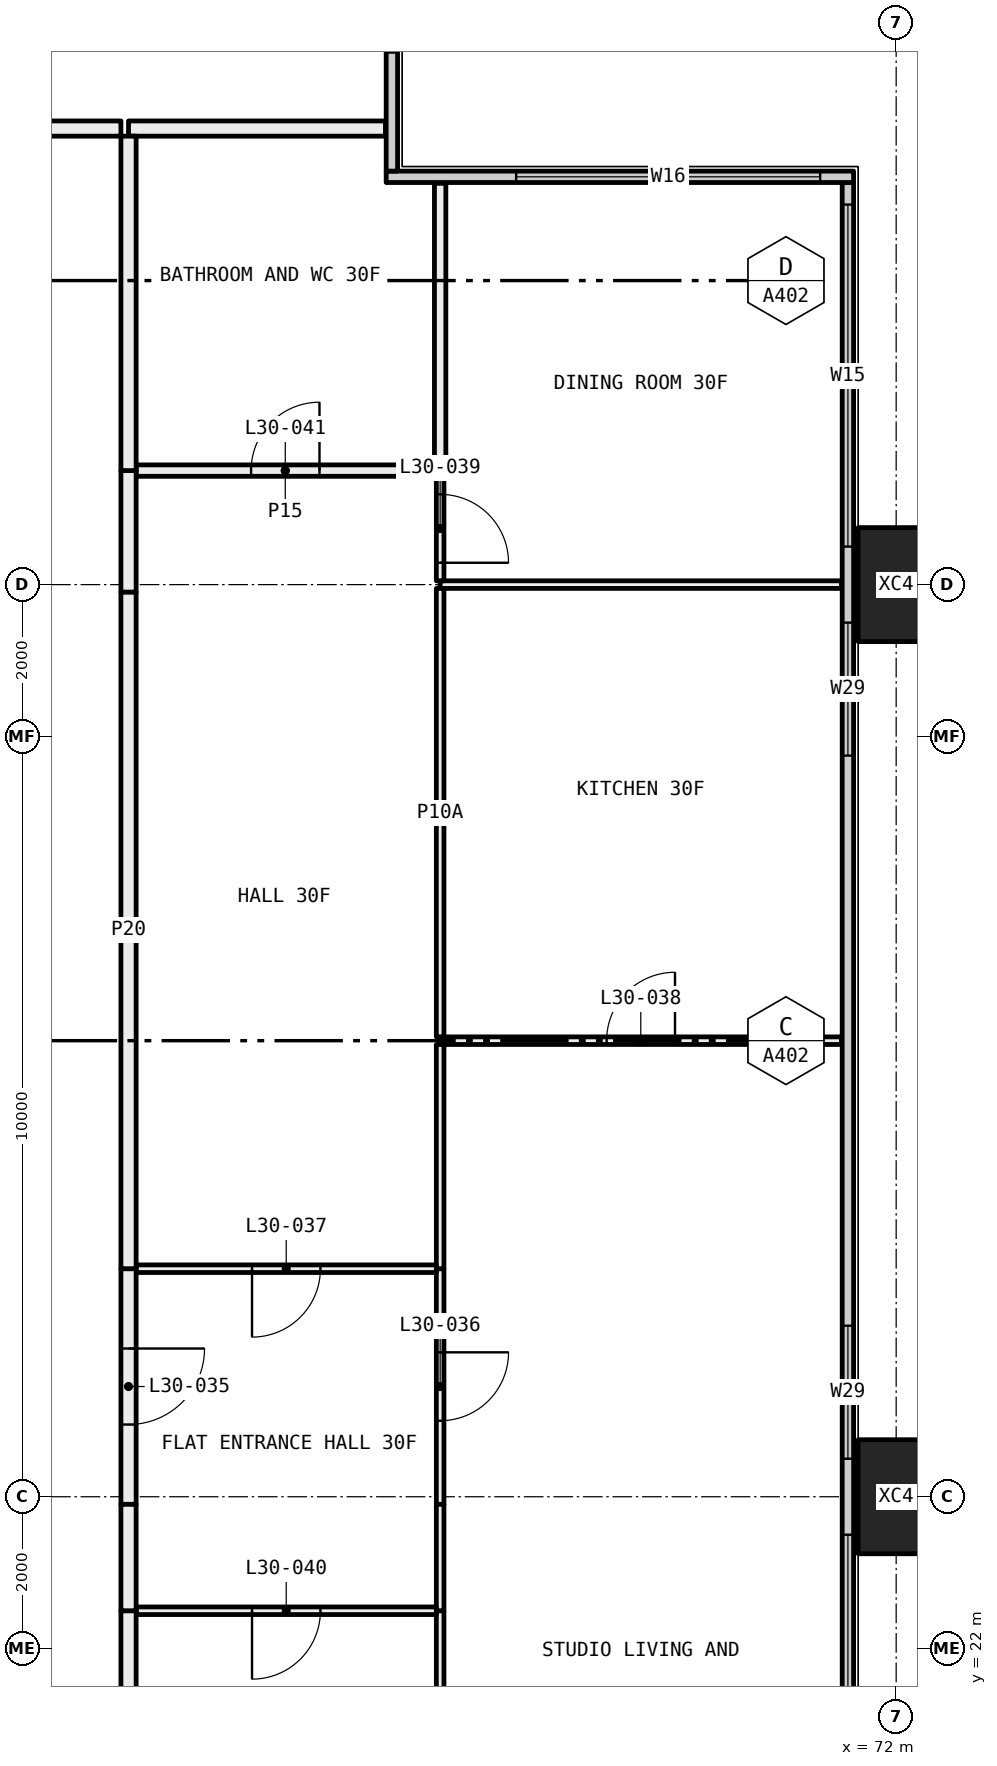
"""IFC4 building model, lengths in metres.
Left out: names, types, materials, properties, quantities, classifications, styles, units other than length and angle.
Written with IfcOpenShell. Run it as: python <this file> out.ifc"""

import sys

from ifc_helpers import new_model, si_unit, direction, frame, frame_2d, origin, origin_2d, place, context, subcontext, project, spatial, rectangle, hollow_rectangle, extrude, element, fill, save


model = new_model("IFC4")
c1 = context("Model", 3, precision=1e-05, world=origin(), true_north=direction((0.0, 1.0)))
c2 = subcontext(c1, "Body", "Model", "MODEL_VIEW")
j1 = project(units=[si_unit("LENGTHUNIT", "METRE"), si_unit("PLANEANGLEUNIT", "RADIAN")], contexts=[c1])
p1 = place(None, origin())
s1 = spatial("IfcSite", under=j1, at=p1, CompositionType="ELEMENT")
p2 = place(p1, origin())
s2 = spatial("IfcBuilding", under=s1, at=p2, CompositionType="ELEMENT")
p3 = place(p2, frame((0.0, 0.0, 117.3)))
s3 = spatial("IfcBuildingStorey", under=s2, at=p3, CompositionType="ELEMENT", Elevation=117.3)
for number, where, z_axis, x_axis in (
    (1, (72.0, 24.0, -0.4), (0.0, 0.0, 1.0), (0.0, 1.0, 0.0)),
    (2, (72.0, 36.0, -0.4), (0.0, 0.0, 1.0), (0.0, 1.0, 0.0)),
):
    element("IfcColumn", number, at=place(p3, frame(where, z_axis=z_axis, x_axis=x_axis)), inside=s3, PredefinedType="COLUMN", context=c2, shape_type="SweptSolid", body=[
        extrude(hollow_rectangle(XDim=1.5, YDim=1.0, WallThickness=0.06, at=origin_2d()), origin(), (0.0, 0.0, 1.0), 3.45),
    ])
p4 = place(p3, frame((71.365, 18.71, 0.0), z_axis=(0.0, 0.0, 1.0), x_axis=(0.0, 1.0, 0.0)))
e3 = element("IfcWall", 3, at=p4, inside=s3, PredefinedType="ELEMENTEDWALL", context=c2, shape_type="SweptSolid", body=[
    extrude(rectangle(XDim=22.58, YDim=0.15, at=frame_2d((11.29, 0.0))), origin(), (0.0, 0.0, 1.0), 3.05),
])
p5 = place(p4, frame((0.29, 0.0, 0.45)))
e4 = element("IfcOpeningElement", 4, at=p5, cuts=e3, PredefinedType="OPENING", context=c2, shape_type="SweptSolid", body=[
    extrude(rectangle(XDim=4.5, YDim=2.55, at=frame_2d((2.25, 1.275))), frame((0.0, 0.085, 0.0), z_axis=(0.0, -1.0, 0.0), x_axis=(1.0, 0.0, 0.0)), (0.0, 0.0, 1.0), 0.17),
])
p6 = place(p4, frame((5.79, 0.0, 0.45)))
e5 = element("IfcOpeningElement", 5, at=p6, cuts=e3, PredefinedType="OPENING", context=c2, shape_type="SweptSolid", body=[
    extrude(rectangle(XDim=1.75, YDim=2.55, at=frame_2d((0.875, 1.275))), frame((0.0, 0.085, 0.0), z_axis=(0.0, -1.0, 0.0), x_axis=(1.0, 0.0, 0.0)), (0.0, 0.0, 1.0), 0.17),
])
p7 = place(p4, frame((15.04, 0.0, 0.45)))
e6 = element("IfcOpeningElement", 6, at=p7, cuts=e3, PredefinedType="OPENING", context=c2, shape_type="SweptSolid", body=[
    extrude(rectangle(XDim=1.75, YDim=2.55, at=frame_2d((0.875, 1.275))), frame((0.0, 0.085, 0.0), z_axis=(0.0, -1.0, 0.0), x_axis=(1.0, 0.0, 0.0)), (0.0, 0.0, 1.0), 0.17),
])
p8 = place(p4, frame((17.79, 0.0, 0.45)))
e7 = element("IfcOpeningElement", 7, at=p8, cuts=e3, PredefinedType="OPENING", context=c2, shape_type="SweptSolid", body=[
    extrude(rectangle(XDim=4.5, YDim=2.55, at=frame_2d((2.25, 1.275))), frame((0.0, 0.085, 0.0), z_axis=(0.0, -1.0, 0.0), x_axis=(1.0, 0.0, 0.0)), (0.0, 0.0, 1.0), 0.17),
])
p9 = place(p3, frame((65.29, 41.365, 0.0), z_axis=(0.0, 0.0, 1.0), x_axis=(1.0, 0.0, 0.0)))
e8 = element("IfcWall", 8, at=p9, inside=s3, PredefinedType="ELEMENTEDWALL", context=c2, shape_type="SweptSolid", body=[
    extrude(rectangle(XDim=6.15, YDim=0.15, at=frame_2d((3.075, 0.0))), origin(), (0.0, 0.0, 1.0), 3.05),
])
p10 = place(p9, frame((1.71, 0.0, 0.45)))
e9 = element("IfcOpeningElement", 9, at=p10, cuts=e8, PredefinedType="OPENING", context=c2, shape_type="SweptSolid", body=[
    extrude(rectangle(XDim=4.0, YDim=2.55, at=frame_2d((2.0, 1.275))), frame((0.0, 0.085, 0.0), z_axis=(0.0, -1.0, 0.0), x_axis=(1.0, 0.0, 0.0)), (0.0, 0.0, 1.0), 0.17),
])
p11 = place(p3, frame((65.365, 41.44, 0.0), z_axis=(0.0, 0.0, 1.0), x_axis=(0.0, 1.0, 0.0)))
e10 = element("IfcWall", 10, at=p11, inside=s3, PredefinedType="ELEMENTEDWALL", context=c2, shape_type="SweptSolid", body=[
    extrude(rectangle(XDim=5.85, YDim=0.15, at=frame_2d((2.925, 0.0))), origin(), (0.0, 0.0, 1.0), 3.05),
])
p12 = place(p11, frame((1.56, 0.0, 0.45)))
e11 = element("IfcOpeningElement", 11, at=p12, cuts=e10, PredefinedType="OPENING", context=c2, shape_type="SweptSolid", body=[
    extrude(rectangle(XDim=4.0, YDim=2.55, at=frame_2d((2.0, 1.275))), frame((0.0, 0.085, 0.0), z_axis=(0.0, -1.0, 0.0), x_axis=(1.0, 0.0, 0.0)), (0.0, 0.0, 1.0), 0.17),
])
p13 = place(p3, frame((71.28, 30.0, 0.0), z_axis=(0.0, 0.0, 1.0), x_axis=(-1.0, 0.0, 0.0)))
e12 = element("IfcWall", 12, at=p13, inside=s3, PredefinedType="PARTITIONING", context=c2, shape_type="SweptSolid", body=[
    extrude(rectangle(XDim=5.28, YDim=0.1, at=frame_2d((2.64, 0.0))), origin(), (0.0, 0.0, 1.0), 3.05),
])
p14 = place(p13, frame((2.19, 0.0, 0.0)))
e13 = element("IfcOpeningElement", 13, at=p14, cuts=e12, PredefinedType="OPENING", context=c2, shape_type="SweptSolid", body=[
    extrude(rectangle(XDim=0.9, YDim=2.1, at=frame_2d((0.45, 1.05))), frame((0.0, 0.06, 0.0), z_axis=(0.0, -1.0, 0.0), x_axis=(1.0, 0.0, 0.0)), (0.0, 0.0, 1.0), 0.12),
])
p15 = place(p3, frame((66.0, 22.5, 0.0), z_axis=(0.0, 0.0, 1.0), x_axis=(0.0, -1.0, 0.0)))
e14 = element("IfcWall", 14, at=p15, inside=s3, PredefinedType="PARTITIONING", context=c2, shape_type="SweptSolid", body=[
    extrude(rectangle(XDim=3.78, YDim=0.1, at=frame_2d((1.89, 0.0))), origin(), (0.0, 0.0, 1.0), 3.05),
])
p16 = place(p3, frame((66.0, 27.0, 0.0), z_axis=(0.0, 0.0, 1.0), x_axis=(0.0, -1.0, 0.0)))
e15 = element("IfcWall", 15, at=p16, inside=s3, PredefinedType="PARTITIONING", context=c2, shape_type="SweptSolid", body=[
    extrude(rectangle(XDim=3.1, YDim=0.1, at=frame_2d((1.55, 0.0))), origin(), (0.0, 0.0, 1.0), 2.45),
])
p17 = place(p16, frame((1.1, 0.0, 0.0)))
e16 = element("IfcOpeningElement", 16, at=p17, cuts=e15, PredefinedType="OPENING", context=c2, shape_type="SweptSolid", body=[
    extrude(rectangle(XDim=0.9, YDim=2.1, at=frame_2d((0.45, 1.05))), frame((0.0, 0.06, 0.0), z_axis=(0.0, -1.0, 0.0), x_axis=(1.0, 0.0, 0.0)), (0.0, 0.0, 1.0), 0.12),
])
p18 = place(p3, frame((66.0, 23.9, 0.0), z_axis=(0.0, 0.0, 1.0), x_axis=(0.0, -1.0, 0.0)))
e17 = element("IfcWall", 17, at=p18, inside=s3, PredefinedType="PARTITIONING", context=c2, shape_type="SweptSolid", body=[
    extrude(rectangle(XDim=1.4, YDim=0.1, at=frame_2d((0.7, 0.0))), origin(), (0.0, 0.0, 1.0), 3.05),
])
p19 = place(p3, frame((66.0, 29.95, 0.0), z_axis=(0.0, 0.0, 1.0), x_axis=(0.0, -1.0, 0.0)))
e18 = element("IfcWall", 18, at=p19, inside=s3, PredefinedType="PARTITIONING", context=c2, shape_type="SweptSolid", body=[
    extrude(rectangle(XDim=2.95, YDim=0.1, at=frame_2d((1.475, 0.0))), origin(), (0.0, 0.0, 1.0), 3.05),
])
p20 = place(p3, frame((71.28, 36.0, 0.0), z_axis=(0.0, 0.0, 1.0), x_axis=(-1.0, 0.0, 0.0)))
e19 = element("IfcWall", 19, at=p20, inside=s3, PredefinedType="PARTITIONING", context=c2, shape_type="SweptSolid", body=[
    extrude(rectangle(XDim=5.28, YDim=0.1, at=frame_2d((2.64, 0.0))), origin(), (0.0, 0.0, 1.0), 2.45),
])
p21 = place(p3, frame((66.0, 35.95, 0.0), z_axis=(0.0, 0.0, 1.0), x_axis=(0.0, -1.0, 0.0)))
e20 = element("IfcWall", 20, at=p21, inside=s3, PredefinedType="PARTITIONING", context=c2, shape_type="SweptSolid", body=[
    extrude(rectangle(XDim=5.9, YDim=0.1, at=frame_2d((2.95, 0.0))), origin(), (0.0, 0.0, 1.0), 2.45),
])
p22 = place(p3, frame((66.0, 37.425, 0.0), z_axis=(0.0, 0.0, 1.0), x_axis=(0.0, -1.0, 0.0)))
e21 = element("IfcWall", 21, at=p22, inside=s3, PredefinedType="PARTITIONING", context=c2, shape_type="SweptSolid", body=[
    extrude(rectangle(XDim=1.375, YDim=0.1, at=frame_2d((0.688, 0.0))), origin(), (0.0, 0.0, 1.0), 2.45),
])
p23 = place(p22, frame((0.238, 0.0, 0.0)))
e22 = element("IfcOpeningElement", 22, at=p23, cuts=e21, PredefinedType="OPENING", context=c2, shape_type="SweptSolid", body=[
    extrude(rectangle(XDim=0.9, YDim=2.1, at=frame_2d((0.45, 1.05))), frame((0.0, 0.06, 0.0), z_axis=(0.0, -1.0, 0.0), x_axis=(1.0, 0.0, 0.0)), (0.0, 0.0, 1.0), 0.12),
])
p24 = place(p3, frame((66.0, 41.28, 0.0), z_axis=(0.0, 0.0, 1.0), x_axis=(0.0, -1.0, 0.0)))
e23 = element("IfcWall", 23, at=p24, inside=s3, PredefinedType="PARTITIONING", context=c2, shape_type="SweptSolid", body=[
    extrude(rectangle(XDim=3.78, YDim=0.15, at=frame_2d((1.89, 0.0))), origin(), (0.0, 0.0, 1.0), 3.05),
])
p25 = place(p3, frame((65.95, 22.5, 0.0), z_axis=(0.0, 0.0, 1.0), x_axis=(-1.0, 0.0, 0.0)))
e24 = element("IfcWall", 24, at=p25, inside=s3, PredefinedType="PARTITIONING", context=c2, shape_type="SweptSolid", body=[
    extrude(rectangle(XDim=3.95, YDim=0.1, at=frame_2d((1.975, 0.0))), origin(), (0.0, 0.0, 1.0), 3.05),
])
p26 = place(p25, frame((1.525, 0.0, 0.0)))
e25 = element("IfcOpeningElement", 25, at=p26, cuts=e24, PredefinedType="OPENING", context=c2, shape_type="SweptSolid", body=[
    extrude(rectangle(XDim=0.9, YDim=2.1, at=frame_2d((0.45, 1.05))), frame((0.0, 0.06, 0.0), z_axis=(0.0, -1.0, 0.0), x_axis=(1.0, 0.0, 0.0)), (0.0, 0.0, 1.0), 0.12),
])
p27 = place(p3, frame((61.9, 22.5, 0.0), z_axis=(0.0, 0.0, 1.0), x_axis=(0.0, -1.0, 0.0)))
e26 = element("IfcWall", 26, at=p27, inside=s3, PredefinedType="PARTITIONING", context=c2, shape_type="SweptSolid", body=[
    extrude(rectangle(XDim=4.4, YDim=0.2, at=frame_2d((2.2, 0.0))), origin(), (0.0, 0.0, 1.0), 3.05),
])
p28 = place(p3, frame((65.95, 27.0, 0.0), z_axis=(0.0, 0.0, 1.0), x_axis=(-1.0, 0.0, 0.0)))
e27 = element("IfcWall", 27, at=p28, inside=s3, PredefinedType="PARTITIONING", context=c2, shape_type="SweptSolid", body=[
    extrude(rectangle(XDim=3.95, YDim=0.1, at=frame_2d((1.975, 0.0))), origin(), (0.0, 0.0, 1.0), 3.05),
])
p29 = place(p28, frame((1.525, 0.0, 0.0)))
e28 = element("IfcOpeningElement", 28, at=p29, cuts=e27, PredefinedType="OPENING", context=c2, shape_type="SweptSolid", body=[
    extrude(rectangle(XDim=0.9, YDim=2.1, at=frame_2d((0.45, 1.05))), frame((0.0, 0.06, 0.0), z_axis=(0.0, -1.0, 0.0), x_axis=(1.0, 0.0, 0.0)), (0.0, 0.0, 1.0), 0.12),
])
p30 = place(p3, frame((61.9, 27.0, 0.0), z_axis=(0.0, 0.0, 1.0), x_axis=(0.0, -1.0, 0.0)))
e29 = element("IfcWall", 29, at=p30, inside=s3, PredefinedType="PARTITIONING", context=c2, shape_type="SweptSolid", body=[
    extrude(rectangle(XDim=3.1, YDim=0.2, at=frame_2d((1.55, 0.0))), origin(), (0.0, 0.0, 1.0), 2.45),
])
p31 = place(p30, frame((1.05, 0.0, 0.0)))
e30 = element("IfcOpeningElement", 30, at=p31, cuts=e29, PredefinedType="OPENING", context=c2, shape_type="SweptSolid", body=[
    extrude(rectangle(XDim=1.0, YDim=2.1, at=frame_2d((0.5, 1.05))), frame((0.0, 0.11, 0.0), z_axis=(0.0, -1.0, 0.0), x_axis=(1.0, 0.0, 0.0)), (0.0, 0.0, 1.0), 0.22),
])
p32 = place(p3, frame((61.9, 23.9, 0.0), z_axis=(0.0, 0.0, 1.0), x_axis=(0.0, -1.0, 0.0)))
e31 = element("IfcWall", 31, at=p32, inside=s3, PredefinedType="PARTITIONING", context=c2, shape_type="SweptSolid", body=[
    extrude(rectangle(XDim=1.4, YDim=0.2, at=frame_2d((0.7, 0.0))), origin(), (0.0, 0.0, 1.0), 3.05),
])
p33 = place(p3, frame((65.925, 37.5, 0.0), z_axis=(0.0, 0.0, 1.0), x_axis=(-1.0, 0.0, 0.0)))
e32 = element("IfcWall", 32, at=p33, inside=s3, PredefinedType="PARTITIONING", context=c2, shape_type="SweptSolid", body=[
    extrude(rectangle(XDim=3.925, YDim=0.15, at=frame_2d((1.962, 0.0))), origin(), (0.0, 0.0, 1.0), 3.05),
])
p34 = place(p33, frame((1.512, 0.0, 0.0)))
e33 = element("IfcOpeningElement", 33, at=p34, cuts=e32, PredefinedType="OPENING", context=c2, shape_type="SweptSolid", body=[
    extrude(rectangle(XDim=0.9, YDim=2.1, at=frame_2d((0.45, 1.05))), frame((0.0, 0.085, 0.0), z_axis=(0.0, -1.0, 0.0), x_axis=(1.0, 0.0, 0.0)), (0.0, 0.0, 1.0), 0.17),
])
p35 = place(p3, frame((61.9, 37.5, 0.0), z_axis=(0.0, 0.0, 1.0), x_axis=(0.0, -1.0, 0.0)))
e34 = element("IfcWall", 34, at=p35, inside=s3, PredefinedType="PARTITIONING", context=c2, shape_type="SweptSolid", body=[
    extrude(rectangle(XDim=1.6, YDim=0.2, at=frame_2d((0.8, 0.0))), origin(), (0.0, 0.0, 1.0), 2.45),
])
p36 = place(p3, frame((61.9, 35.9, 0.0), z_axis=(0.0, 0.0, 1.0), x_axis=(0.0, -1.0, 0.0)))
e35 = element("IfcWall", 35, at=p36, inside=s3, PredefinedType="PARTITIONING", context=c2, shape_type="SweptSolid", body=[
    extrude(rectangle(XDim=8.9, YDim=0.2, at=frame_2d((4.45, 0.0))), origin(), (0.0, 0.0, 1.0), 3.05),
])
p37 = place(p3, frame((65.28, 42.0, 0.0), z_axis=(0.0, 0.0, 1.0), x_axis=(-1.0, 0.0, 0.0)))
e36 = element("IfcWall", 36, at=p37, inside=s3, PredefinedType="PARTITIONING", context=c2, shape_type="SweptSolid", body=[
    extrude(rectangle(XDim=3.38, YDim=0.2, at=frame_2d((1.69, 0.0))), origin(), (0.0, 0.0, 1.0), 3.05),
])
p38 = place(p3, frame((61.9, 41.9, 0.0), z_axis=(0.0, 0.0, 1.0), x_axis=(0.0, -1.0, 0.0)))
e37 = element("IfcWall", 37, at=p38, inside=s3, PredefinedType="PARTITIONING", context=c2, shape_type="SweptSolid", body=[
    extrude(rectangle(XDim=4.4, YDim=0.2, at=frame_2d((2.2, 0.0))), origin(), (0.0, 0.0, 1.0), 3.05),
])
p39 = place(p3, frame((54.0, 42.0, 0.0), z_axis=(0.0, 0.0, 1.0), x_axis=(1.0, 0.0, 0.0)))
e38 = element("IfcWall", 38, at=p39, inside=s3, PredefinedType="PARTITIONING", context=c2, shape_type="SweptSolid", body=[
    extrude(rectangle(XDim=7.8, YDim=0.2, at=frame_2d((3.9, 0.0))), origin(), (0.0, 0.0, 1.0), 3.05),
])
p40 = place(p5, origin())
e39 = element("IfcWindow", 39, at=p40, inside=s3, PartitioningType="SINGLE_PANEL", PredefinedType="WINDOW", context=c2, shape_type="SweptSolid", body=[
    extrude(rectangle(XDim=4.5, YDim=2.55, at=frame_2d((2.25, 1.275))), frame((0.0, 0.03, 0.0), z_axis=(0.0, -1.0, 0.0), x_axis=(1.0, 0.0, 0.0)), (0.0, 0.0, 1.0), 0.06),
])
fill(e4, e39)
p41 = place(p6, origin())
e40 = element("IfcWindow", 40, at=p41, inside=s3, PartitioningType="SINGLE_PANEL", PredefinedType="WINDOW", context=c2, shape_type="SweptSolid", body=[
    extrude(rectangle(XDim=1.75, YDim=2.55, at=frame_2d((0.875, 1.275))), frame((0.0, 0.03, 0.0), z_axis=(0.0, -1.0, 0.0), x_axis=(1.0, 0.0, 0.0)), (0.0, 0.0, 1.0), 0.06),
])
fill(e5, e40)
p42 = place(p7, origin())
e41 = element("IfcWindow", 41, at=p42, inside=s3, PartitioningType="SINGLE_PANEL", PredefinedType="WINDOW", context=c2, shape_type="SweptSolid", body=[
    extrude(rectangle(XDim=1.75, YDim=2.55, at=frame_2d((0.875, 1.275))), frame((0.0, 0.03, 0.0), z_axis=(0.0, -1.0, 0.0), x_axis=(1.0, 0.0, 0.0)), (0.0, 0.0, 1.0), 0.06),
])
fill(e6, e41)
p43 = place(p8, origin())
e42 = element("IfcWindow", 42, at=p43, inside=s3, PartitioningType="SINGLE_PANEL", PredefinedType="WINDOW", context=c2, shape_type="SweptSolid", body=[
    extrude(rectangle(XDim=4.5, YDim=2.55, at=frame_2d((2.25, 1.275))), frame((0.0, 0.03, 0.0), z_axis=(0.0, -1.0, 0.0), x_axis=(1.0, 0.0, 0.0)), (0.0, 0.0, 1.0), 0.06),
])
fill(e7, e42)
p44 = place(p10, origin())
e43 = element("IfcWindow", 43, at=p44, inside=s3, PartitioningType="SINGLE_PANEL", PredefinedType="WINDOW", context=c2, shape_type="SweptSolid", body=[
    extrude(rectangle(XDim=4.0, YDim=2.55, at=frame_2d((2.0, 1.275))), frame((0.0, 0.03, 0.0), z_axis=(0.0, -1.0, 0.0), x_axis=(1.0, 0.0, 0.0)), (0.0, 0.0, 1.0), 0.06),
])
fill(e9, e43)
p45 = place(p31, origin())
e44 = element("IfcDoor", 44, at=p45, inside=s3, OperationType="SINGLE_SWING_RIGHT", PredefinedType="DOOR", context=c2, shape_type="SweptSolid", body=[
    extrude(rectangle(XDim=1.0, YDim=2.1, at=frame_2d((0.5, 1.05))), frame((0.0, 0.025, 0.0), z_axis=(0.0, -1.0, 0.0), x_axis=(1.0, 0.0, 0.0)), (0.0, 0.0, 1.0), 0.05),
])
fill(e30, e44)
p46 = place(p17, origin())
e45 = element("IfcDoor", 45, at=p46, inside=s3, OperationType="SINGLE_SWING_RIGHT", PredefinedType="DOOR", context=c2, shape_type="SweptSolid", body=[
    extrude(rectangle(XDim=0.9, YDim=2.1, at=frame_2d((0.45, 1.05))), frame((0.0, 0.025, 0.0), z_axis=(0.0, -1.0, 0.0), x_axis=(1.0, 0.0, 0.0)), (0.0, 0.0, 1.0), 0.05),
])
fill(e16, e45)
p47 = place(p29, origin())
e46 = element("IfcDoor", 46, at=p47, inside=s3, OperationType="SINGLE_SWING_LEFT", PredefinedType="DOOR", context=c2, shape_type="SweptSolid", body=[
    extrude(rectangle(XDim=0.9, YDim=2.1, at=frame_2d((0.45, 1.05))), frame((0.0, 0.025, 0.0), z_axis=(0.0, -1.0, 0.0), x_axis=(1.0, 0.0, 0.0)), (0.0, 0.0, 1.0), 0.05),
])
fill(e28, e46)
p48 = place(p14, frame((0.9, 0.0, 0.0), x_axis=(-1.0, 0.0, 0.0)))
e47 = element("IfcDoor", 47, at=p48, inside=s3, OperationType="SINGLE_SWING_LEFT", PredefinedType="DOOR", context=c2, shape_type="SweptSolid", body=[
    extrude(rectangle(XDim=0.9, YDim=2.1, at=frame_2d((0.45, 1.05))), frame((0.0, 0.025, 0.0), z_axis=(0.0, -1.0, 0.0), x_axis=(1.0, 0.0, 0.0)), (0.0, 0.0, 1.0), 0.05),
])
fill(e13, e47)
p49 = place(p23, origin())
e48 = element("IfcDoor", 48, at=p49, inside=s3, OperationType="SINGLE_SWING_LEFT", PredefinedType="DOOR", context=c2, shape_type="SweptSolid", body=[
    extrude(rectangle(XDim=0.9, YDim=2.1, at=frame_2d((0.45, 1.05))), frame((0.0, 0.025, 0.0), z_axis=(0.0, -1.0, 0.0), x_axis=(1.0, 0.0, 0.0)), (0.0, 0.0, 1.0), 0.05),
])
fill(e22, e48)
p50 = place(p26, origin())
e49 = element("IfcDoor", 49, at=p50, inside=s3, OperationType="SINGLE_SWING_LEFT", PredefinedType="DOOR", context=c2, shape_type="SweptSolid", body=[
    extrude(rectangle(XDim=0.9, YDim=2.1, at=frame_2d((0.45, 1.05))), frame((0.0, 0.025, 0.0), z_axis=(0.0, -1.0, 0.0), x_axis=(1.0, 0.0, 0.0)), (0.0, 0.0, 1.0), 0.05),
])
fill(e25, e49)
p51 = place(p34, frame((0.9, 0.0, 0.0), x_axis=(-1.0, 0.0, 0.0)))
e50 = element("IfcDoor", 50, at=p51, inside=s3, OperationType="SINGLE_SWING_LEFT", PredefinedType="DOOR", context=c2, shape_type="SweptSolid", body=[
    extrude(rectangle(XDim=0.9, YDim=2.1, at=frame_2d((0.45, 1.05))), frame((0.0, 0.025, 0.0), z_axis=(0.0, -1.0, 0.0), x_axis=(1.0, 0.0, 0.0)), (0.0, 0.0, 1.0), 0.05),
])
fill(e33, e50)
save(model, sys.argv[1])
